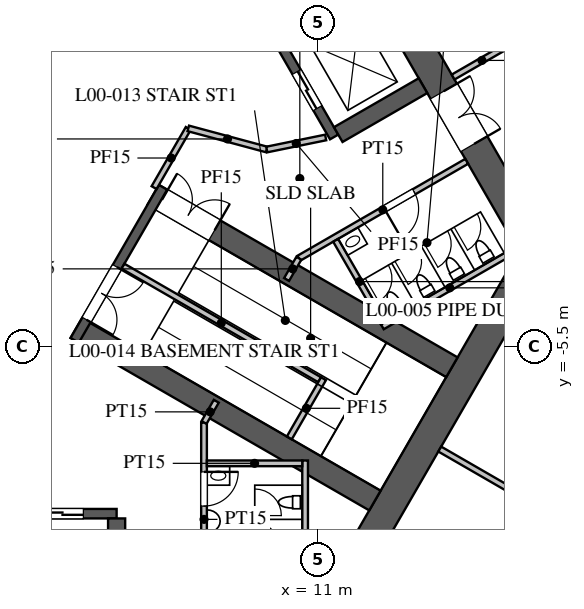
"""IFC4 building model, lengths in metres.
Left out: names, types, materials, properties, quantities, classifications, styles, units other than length and angle.
Written with IfcOpenShell. Run it as: python <this file> out.ifc"""

import sys

from ifc_helpers import new_model, si_unit, direction, frame, frame_2d, origin, place, context, subcontext, project, spatial, polyline, rectangle, outline, extrude, element, fill, save


model = new_model("IFC4")
c1 = context("Model", 3, precision=1e-05, world=origin(), true_north=direction((0.0, 1.0)))
c2 = subcontext(c1, "Body", "Model", "MODEL_VIEW")
j1 = project(units=[si_unit("LENGTHUNIT", "METRE"), si_unit("PLANEANGLEUNIT", "RADIAN")], contexts=[c1])
p1 = place(None, origin())
s1 = spatial("IfcSite", under=j1, at=p1, CompositionType="ELEMENT")
p2 = place(p1, origin())
s2 = spatial("IfcBuilding", under=s1, at=p2, CompositionType="ELEMENT")
p3 = place(p2, origin())
s3 = spatial("IfcBuildingStorey", under=s2, at=p3, CompositionType="ELEMENT", Elevation=0.0)
p4 = place(p3, frame((10.97, -13.0, 0.0), z_axis=(0.0, 0.0, 1.0), x_axis=(0.499995765644, 0.866027848477, 0.0)))
e1 = element("IfcWall", 1, at=p4, inside=s3, PredefinedType="SHEAR", context=c2, shape_type="SweptSolid", body=[
    extrude(rectangle(XDim=11.547, YDim=0.8, at=frame_2d((5.773, 0.0))), origin(), (0.0, 0.0, 1.0), 6.5),
])
p5 = place(p3, frame((16.743, -3.0, 0.0), z_axis=(0.0, 0.0, 1.0), x_axis=(-0.500002442456, 0.866023993627, 0.0)))
e2 = element("IfcWall", 2, at=p5, inside=s3, PredefinedType="SHEAR", context=c2, shape_type="SweptSolid", body=[
    extrude(rectangle(XDim=21.939, YDim=0.8, at=frame_2d((10.97, 0.0))), origin(), (0.0, 0.0, 1.0), 6.5),
])
p6 = place(p5, frame((17.27, 0.0, 0.0)))
e3 = element("IfcOpeningElement", 3, at=p6, cuts=e2, PredefinedType="OPENING", context=c2, shape_type="SweptSolid", body=[
    extrude(rectangle(XDim=1.2, YDim=2.1, at=frame_2d((0.6, 1.05))), frame((0.0, 0.41, 0.0), z_axis=(0.0, -1.0, 0.0), x_axis=(1.0, 0.0, 0.0)), (0.0, 0.0, 1.0), 0.82),
])
p7 = place(p5, frame((3.27, 0.0, 0.0)))
e4 = element("IfcOpeningElement", 4, at=p7, cuts=e2, PredefinedType="OPENING", context=c2, shape_type="SweptSolid", body=[
    extrude(rectangle(XDim=1.6, YDim=2.1, at=frame_2d((0.8, 1.05))), frame((0.0, 0.41, 0.0), z_axis=(0.0, -1.0, 0.0), x_axis=(1.0, 0.0, 0.0)), (0.0, 0.0, 1.0), 0.82),
])
p8 = place(p3, frame((-5.7, -9.9, 0.0), z_axis=(0.0, 0.0, 1.0), x_axis=(1.0, 0.0, 0.0)))
e5 = element("IfcWall", 5, at=p8, inside=s3, PredefinedType="SHEAR", context=c2, shape_type="SweptSolid", body=[
    extrude(rectangle(XDim=11.4, YDim=0.25, at=frame_2d((5.7, 0.0))), origin(), (0.0, 0.0, 1.0), 6.5),
])
p9 = place(p8, frame((0.875, 0.0, 0.0)))
e6 = element("IfcOpeningElement", 6, at=p9, cuts=e5, PredefinedType="OPENING", context=c2, shape_type="SweptSolid", body=[
    extrude(rectangle(XDim=1.1, YDim=2.2, at=frame_2d((0.55, 1.1))), frame((0.0, 0.135, 0.0), z_axis=(0.0, -1.0, 0.0), x_axis=(1.0, 0.0, 0.0)), (0.0, 0.0, 1.0), 0.27),
])
p10 = place(p8, frame((3.725, 0.0, 0.0)))
e7 = element("IfcOpeningElement", 7, at=p10, cuts=e5, PredefinedType="OPENING", context=c2, shape_type="SweptSolid", body=[
    extrude(rectangle(XDim=1.1, YDim=2.2, at=frame_2d((0.55, 1.1))), frame((0.0, 0.135, 0.0), z_axis=(0.0, -1.0, 0.0), x_axis=(1.0, 0.0, 0.0)), (0.0, 0.0, 1.0), 0.27),
])
p11 = place(p8, frame((6.575, 0.0, 0.0)))
e8 = element("IfcOpeningElement", 8, at=p11, cuts=e5, PredefinedType="OPENING", context=c2, shape_type="SweptSolid", body=[
    extrude(rectangle(XDim=1.1, YDim=2.2, at=frame_2d((0.55, 1.1))), frame((0.0, 0.135, 0.0), z_axis=(0.0, -1.0, 0.0), x_axis=(1.0, 0.0, 0.0)), (0.0, 0.0, 1.0), 0.27),
])
p12 = place(p8, frame((9.425, 0.0, 0.0)))
e9 = element("IfcOpeningElement", 9, at=p12, cuts=e5, PredefinedType="OPENING", context=c2, shape_type="SweptSolid", body=[
    extrude(rectangle(XDim=1.1, YDim=2.2, at=frame_2d((0.55, 1.1))), frame((0.0, 0.135, 0.0), z_axis=(0.0, -1.0, 0.0), x_axis=(1.0, 0.0, 0.0)), (0.0, 0.0, 1.0), 0.27),
])
p13 = place(p3, frame((5.7, -10.025, 0.0), z_axis=(0.0, 0.0, 1.0), x_axis=(0.0, -1.0, 0.0)))
e10 = element("IfcWall", 10, at=p13, inside=s3, PredefinedType="SHEAR", context=c2, shape_type="SweptSolid", body=[
    extrude(rectangle(XDim=2.575, YDim=0.45, at=frame_2d((1.288, 0.0))), origin(), (0.0, 0.0, 1.0), 6.5),
])
p14 = place(p3, frame((11.424, 0.014, 0.0), z_axis=(0.0, 0.0, 1.0), x_axis=(-0.500001763848, 0.866024385424, 0.0)))
e11 = element("IfcWall", 11, at=p14, inside=s3, PredefinedType="SHEAR", context=c2, shape_type="SweptSolid", body=[
    extrude(rectangle(XDim=11.4, YDim=0.25, at=frame_2d((5.7, 0.0))), origin(), (0.0, 0.0, 1.0), 6.5),
])
p15 = place(p14, frame((0.875, 0.0, 0.0)))
e12 = element("IfcOpeningElement", 12, at=p15, cuts=e11, PredefinedType="OPENING", context=c2, shape_type="SweptSolid", body=[
    extrude(rectangle(XDim=1.1, YDim=2.2, at=frame_2d((0.55, 1.1))), frame((0.0, 0.135, 0.0), z_axis=(0.0, -1.0, 0.0), x_axis=(1.0, 0.0, 0.0)), (0.0, 0.0, 1.0), 0.27),
])
p16 = place(p14, frame((3.725, 0.0, 0.0)))
e13 = element("IfcOpeningElement", 13, at=p16, cuts=e11, PredefinedType="OPENING", context=c2, shape_type="SweptSolid", body=[
    extrude(rectangle(XDim=1.1, YDim=2.2, at=frame_2d((0.55, 1.1))), frame((0.0, 0.135, 0.0), z_axis=(0.0, -1.0, 0.0), x_axis=(1.0, 0.0, 0.0)), (0.0, 0.0, 1.0), 0.27),
])
p17 = place(p14, frame((6.575, 0.0, 0.0)))
e14 = element("IfcOpeningElement", 14, at=p17, cuts=e11, PredefinedType="OPENING", context=c2, shape_type="SweptSolid", body=[
    extrude(rectangle(XDim=1.1, YDim=2.2, at=frame_2d((0.55, 1.1))), frame((0.0, 0.135, 0.0), z_axis=(0.0, -1.0, 0.0), x_axis=(1.0, 0.0, 0.0)), (0.0, 0.0, 1.0), 0.27),
])
p18 = place(p14, frame((9.425, 0.0, 0.0)))
e15 = element("IfcOpeningElement", 15, at=p18, cuts=e11, PredefinedType="OPENING", context=c2, shape_type="SweptSolid", body=[
    extrude(rectangle(XDim=1.1, YDim=2.2, at=frame_2d((0.55, 1.1))), frame((0.0, 0.135, 0.0), z_axis=(0.0, -1.0, 0.0), x_axis=(1.0, 0.0, 0.0)), (0.0, 0.0, 1.0), 0.27),
])
p19 = place(p3, frame((11.532, 0.076, 0.0), z_axis=(0.0, 0.0, 1.0), x_axis=(0.866005588531, 0.500034319456, 0.0)))
e16 = element("IfcWall", 16, at=p19, inside=s3, PredefinedType="SHEAR", context=c2, shape_type="SweptSolid", body=[
    extrude(rectangle(XDim=2.575, YDim=0.45, at=frame_2d((1.288, 0.0))), origin(), (0.0, 0.0, 1.0), 6.5),
])
p20 = place(p3, frame((4.638, -5.016, 0.0), z_axis=(0.0, 0.0, 1.0), x_axis=(0.866019375473, -0.500010441196, 0.0)))
e17 = element("IfcWall", 17, at=p20, inside=s3, PredefinedType="SHEAR", context=c2, shape_type="SweptSolid", body=[
    extrude(rectangle(XDim=9.075, YDim=0.6, at=frame_2d((4.538, 0.0))), origin(), (0.0, 0.0, 1.0), 6.5),
])
p21 = place(p3, frame((6.663, -1.509, 0.0), z_axis=(0.0, 0.0, 1.0), x_axis=(0.866019375473, -0.500010441196, 0.0)))
e18 = element("IfcWall", 18, at=p21, inside=s3, PredefinedType="SHEAR", context=c2, shape_type="SweptSolid", body=[
    extrude(rectangle(XDim=9.075, YDim=0.6, at=frame_2d((4.538, 0.0))), origin(), (0.0, 0.0, 1.0), 6.5),
])
p22 = place(p21, frame((0.265, 0.0, 0.0)))
e19 = element("IfcOpeningElement", 19, at=p22, cuts=e18, PredefinedType="OPENING", context=c2, shape_type="SweptSolid", body=[
    extrude(rectangle(XDim=1.6, YDim=2.1, at=frame_2d((0.8, 1.05))), frame((0.0, 0.31, 0.0), z_axis=(0.0, -1.0, 0.0), x_axis=(1.0, 0.0, 0.0)), (0.0, 0.0, 1.0), 0.62),
])
p23 = place(p3, frame((4.597, -5.339, 0.0), z_axis=(0.0, 0.0, 1.0), x_axis=(0.499984536904, 0.866034331223, 0.0)))
e20 = element("IfcWall", 20, at=p23, inside=s3, PredefinedType="SHEAR", context=c2, shape_type="SweptSolid", body=[
    extrude(rectangle(XDim=4.65, YDim=0.25, at=frame_2d((2.325, 0.0))), origin(), (0.0, 0.0, 1.0), 6.5),
])
p24 = place(p23, frame((0.625, 0.0, 0.0)))
e21 = element("IfcOpeningElement", 21, at=p24, cuts=e20, PredefinedType="OPENING", context=c2, shape_type="SweptSolid", body=[
    extrude(rectangle(XDim=1.6, YDim=2.1, at=frame_2d((0.8, 1.05))), frame((0.0, 0.135, 0.0), z_axis=(0.0, -1.0, 0.0), x_axis=(1.0, 0.0, 0.0)), (0.0, 0.0, 1.0), 0.27),
])
p25 = place(p3, frame((8.0, -7.5, 0.0), z_axis=(0.0, 0.0, 1.0), x_axis=(0.0, -1.0, 0.0)))
e22 = element("IfcWall", 22, at=p25, inside=s3, PredefinedType="PARTITIONING", context=c2, shape_type="SweptSolid", body=[
    extrude(rectangle(XDim=5.1, YDim=0.15, at=frame_2d((2.55, 0.0))), origin(), (0.0, 0.0, 1.0), 6.3),
])
p26 = place(p25, frame((1.3, 0.0, 0.0)))
e23 = element("IfcOpeningElement", 23, at=p26, cuts=e22, PredefinedType="OPENING", context=c2, shape_type="SweptSolid", body=[
    extrude(rectangle(XDim=0.9, YDim=2.1, at=frame_2d((0.45, 1.05))), frame((0.0, 0.085, 0.0), z_axis=(0.0, -1.0, 0.0), x_axis=(1.0, 0.0, 0.0)), (0.0, 0.0, 1.0), 0.17),
])
p27 = place(p3, frame((10.495, -3.178, 0.0), z_axis=(0.0, 0.0, 1.0), x_axis=(0.86602216432, 0.500005610874, 0.0)))
e24 = element("IfcWall", 24, at=p27, inside=s3, PredefinedType="PARTITIONING", context=c2, shape_type="SweptSolid", body=[
    extrude(rectangle(XDim=5.1, YDim=0.15, at=frame_2d((2.55, 0.0))), origin(), (0.0, 0.0, 1.0), 6.3),
])
p28 = place(p27, frame((2.6, 0.0, 0.0)))
e25 = element("IfcOpeningElement", 25, at=p28, cuts=e24, PredefinedType="OPENING", context=c2, shape_type="SweptSolid", body=[
    extrude(rectangle(XDim=0.9, YDim=2.1, at=frame_2d((0.45, 1.05))), frame((0.0, 0.085, 0.0), z_axis=(0.0, -1.0, 0.0), x_axis=(1.0, 0.0, 0.0)), (0.0, 0.0, 1.0), 0.17),
])
for number, where, z_axis, x_axis in (
    (26, (8.0, -7.5, 0.0), (0.0, 0.0, 1.0), (0.5, 0.866, 0.0)),
    (27, (10.495, -3.178, 0.0), (0.0, 0.0, 1.0), (-0.5, -0.866, 0.0)),
):
    element("IfcWall", number, at=place(p3, frame(where, z_axis=z_axis, x_axis=x_axis)), inside=s3, PredefinedType="PARTITIONING", context=c2, shape_type="SweptSolid", body=[
        extrude(rectangle(XDim=0.645, YDim=0.15, at=frame_2d((0.323, 0.0))), origin(), (0.0, 0.0, 1.0), 6.3),
    ])
p29 = place(p3, frame((10.66, -8.5, 0.0), z_axis=(0.0, 0.0, 1.0), x_axis=(0.0, -1.0, 0.0)))
e28 = element("IfcWall", 28, at=p29, inside=s3, PredefinedType="PARTITIONING", context=c2, shape_type="SweptSolid", body=[
    extrude(rectangle(XDim=4.1, YDim=0.15, at=frame_2d((2.05, 0.0))), origin(), (0.0, 0.0, 1.0), 6.3),
])
p30 = place(p3, frame((8.075, -8.575, 0.0), z_axis=(0.0, 0.0, 1.0), x_axis=(1.0, 0.0, 0.0)))
e29 = element("IfcWall", 29, at=p30, inside=s3, PredefinedType="PARTITIONING", context=c2, shape_type="SweptSolid", body=[
    extrude(rectangle(XDim=2.51, YDim=0.15, at=frame_2d((1.255, 0.0))), origin(), (0.0, 0.0, 1.0), 6.3),
])
p31 = place(p3, frame((12.691, -4.982, 0.0), z_axis=(0.0, 0.0, 1.0), x_axis=(0.8660249478, 0.500000789788, 0.0)))
e30 = element("IfcWall", 30, at=p31, inside=s3, PredefinedType="PARTITIONING", context=c2, shape_type="SweptSolid", body=[
    extrude(rectangle(XDim=4.1, YDim=0.15, at=frame_2d((2.05, 0.0))), origin(), (0.0, 0.0, 1.0), 6.3),
])
p32 = place(p3, frame((11.464, -2.706, 0.0), z_axis=(0.0, 0.0, 1.0), x_axis=(0.50001992892, -0.866013897511, 0.0)))
e31 = element("IfcWall", 31, at=p32, inside=s3, PredefinedType="PARTITIONING", context=c2, shape_type="SweptSolid", body=[
    extrude(rectangle(XDim=2.51, YDim=0.15, at=frame_2d((1.255, 0.0))), origin(), (0.0, 0.0, 1.0), 6.3),
])
p33 = place(p3, frame((14.203, -8.2, 0.0), z_axis=(0.0, 0.0, 1.0), x_axis=(0.866024965723, -0.500000758745, 0.0)))
e32 = element("IfcWall", 32, at=p33, inside=s3, PredefinedType="PARTITIONING", context=c2, shape_type="SweptSolid", body=[
    extrude(rectangle(XDim=18.25, YDim=0.15, at=frame_2d((9.125, 0.0))), origin(), (0.0, 0.0, 1.0), 4.6),
])
p34 = place(p3, frame((5.867, -3.387, 0.0), z_axis=(0.0, 0.0, 1.0), x_axis=(0.866014108153, -0.500019564097, 0.0)))
e33 = element("IfcWall", 33, at=p34, inside=s3, PredefinedType="PARTITIONING", context=c2, shape_type="SweptSolid", body=[
    extrude(outline(polyline([(0.0, 0.0), (5.975, 0.0), (5.975, 4.014), (1.966, 6.3), (0.0, 6.3), (0.0, 0.0)])), frame((0.0, 0.075, 0.0), z_axis=(0.0, -1.0, 0.0), x_axis=(1.0, 0.0, 0.0)), (0.0, 0.0, 1.0), 0.15),
])
p35 = place(p3, frame((10.244, -7.906, 0.0), z_axis=(0.0, 0.0, 1.0), x_axis=(0.499961193289, 0.866047807691, 0.0)))
e34 = element("IfcWall", 34, at=p35, inside=s3, PredefinedType="PARTITIONING", context=c2, shape_type="SweptSolid", body=[
    extrude(rectangle(XDim=1.8, YDim=0.15, at=frame_2d((0.9, 0.0))), origin(), (0.0, 0.0, 1.0), 3.575),
])
p36 = place(p3, frame((6.686, -1.32, 0.0), z_axis=(0.0, 0.0, 1.0), x_axis=(0.500062916607, 0.865989075817, 0.0)))
e35 = element("IfcWall", 35, at=p36, inside=s3, PredefinedType="PARTITIONING", context=c2, shape_type="SweptSolid", body=[
    extrude(rectangle(XDim=1.8, YDim=0.15, at=frame_2d((0.9, 0.0))), origin(), (0.0, 0.0, 1.0), 6.3),
])
p37 = place(p3, frame((7.586, 0.239, 0.0), z_axis=(0.0, 0.0, 1.0), x_axis=(0.965664233544, -0.259793356447, 0.0)))
e36 = element("IfcWall", 36, at=p37, inside=s3, PredefinedType="PARTITIONING", context=c2, shape_type="SweptSolid", body=[
    extrude(rectangle(XDim=2.139, YDim=0.15, at=frame_2d((1.069, 0.0))), origin(), (0.0, 0.0, 1.0), 6.3),
])
p38 = place(p3, frame((9.651, -0.317, 0.0), z_axis=(0.0, 0.0, 1.0), x_axis=(0.979710109184, 0.200419814298, 0.0)))
e37 = element("IfcWall", 37, at=p38, inside=s3, PredefinedType="PARTITIONING", context=c2, shape_type="SweptSolid", body=[
    extrude(rectangle(XDim=1.581, YDim=0.15, at=frame_2d((0.791, 0.0))), origin(), (0.0, 0.0, 1.0), 6.3),
])
p39 = place(p3, frame((14.555, 1.59, 0.0), z_axis=(0.0, 0.0, 1.0), x_axis=(0.866036909293, 0.499980071345, 0.0)))
e38 = element("IfcWall", 38, at=p39, inside=s3, PredefinedType="PARTITIONING", context=c2, shape_type="SweptSolid", body=[
    extrude(rectangle(XDim=1.75, YDim=0.15, at=frame_2d((0.875, 0.0))), origin(), (0.0, 0.0, 1.0), 6.3),
])
p40 = place(p26, origin())
e39 = element("IfcDoor", 39, at=p40, inside=s3, OperationType="SINGLE_SWING_LEFT", PredefinedType="DOOR", context=c2, shape_type="SweptSolid", body=[
    extrude(rectangle(XDim=0.9, YDim=2.1, at=frame_2d((0.45, 1.05))), frame((0.0, 0.025, 0.0), z_axis=(0.0, -1.0, 0.0), x_axis=(1.0, 0.0, 0.0)), (0.0, 0.0, 1.0), 0.05),
])
fill(e23, e39)
p41 = place(p28, frame((0.9, 0.0, 0.0), z_axis=(0.0, 0.0, 1.0), x_axis=(-1.0, 0.0, 0.0)))
e40 = element("IfcDoor", 40, at=p41, inside=s3, OperationType="SINGLE_SWING_RIGHT", PredefinedType="DOOR", context=c2, shape_type="SweptSolid", body=[
    extrude(rectangle(XDim=0.9, YDim=2.1, at=frame_2d((0.45, 1.05))), frame((0.0, 0.025, 0.0), z_axis=(0.0, -1.0, 0.0), x_axis=(1.0, 0.0, 0.0)), (0.0, 0.0, 1.0), 0.05),
])
fill(e25, e40)
p42 = place(p7, frame((1.6, 0.0, 0.0), z_axis=(0.0, 0.0, 1.0), x_axis=(-1.0, 0.0, 0.0)))
e41 = element("IfcDoor", 41, at=p42, inside=s3, OperationType="DOUBLE_DOOR_SINGLE_SWING", PredefinedType="DOOR", context=c2, shape_type="SweptSolid", body=[
    extrude(rectangle(XDim=1.6, YDim=2.1, at=frame_2d((0.8, 1.05))), frame((0.0, 0.025, 0.0), z_axis=(0.0, -1.0, 0.0), x_axis=(1.0, 0.0, 0.0)), (0.0, 0.0, 1.0), 0.05),
])
fill(e4, e41)
p43 = place(p24, frame((1.6, 0.0, 0.0), z_axis=(0.0, 0.0, 1.0), x_axis=(-1.0, 0.0, 0.0)))
e42 = element("IfcDoor", 42, at=p43, inside=s3, OperationType="DOUBLE_DOOR_SINGLE_SWING", PredefinedType="DOOR", context=c2, shape_type="SweptSolid", body=[
    extrude(rectangle(XDim=1.6, YDim=2.1, at=frame_2d((0.8, 1.05))), frame((0.0, 0.025, 0.0), z_axis=(0.0, -1.0, 0.0), x_axis=(1.0, 0.0, 0.0)), (0.0, 0.0, 1.0), 0.05),
])
fill(e21, e42)
p44 = place(p22, origin())
e43 = element("IfcDoor", 43, at=p44, inside=s3, OperationType="DOUBLE_DOOR_SINGLE_SWING", PredefinedType="DOOR", context=c2, shape_type="SweptSolid", body=[
    extrude(rectangle(XDim=1.6, YDim=2.1, at=frame_2d((0.8, 1.05))), frame((0.0, 0.025, 0.0), z_axis=(0.0, -1.0, 0.0), x_axis=(1.0, 0.0, 0.0)), (0.0, 0.0, 1.0), 0.05),
])
fill(e19, e43)
p45 = place(p12, origin())
e44 = element("IfcDoor", 44, at=p45, inside=s3, OperationType="DOUBLE_DOOR_SLIDING", PredefinedType="DOOR", context=c2, shape_type="SweptSolid", body=[
    extrude(rectangle(XDim=1.1, YDim=2.2, at=frame_2d((0.55, 1.1))), frame((0.0, 0.025, 0.0), z_axis=(0.0, -1.0, 0.0), x_axis=(1.0, 0.0, 0.0)), (0.0, 0.0, 1.0), 0.05),
])
fill(e9, e44)
p46 = place(p15, origin())
e45 = element("IfcDoor", 45, at=p46, inside=s3, OperationType="DOUBLE_DOOR_SLIDING", PredefinedType="DOOR", context=c2, shape_type="SweptSolid", body=[
    extrude(rectangle(XDim=1.1, YDim=2.2, at=frame_2d((0.55, 1.1))), frame((0.0, 0.025, 0.0), z_axis=(0.0, -1.0, 0.0), x_axis=(1.0, 0.0, 0.0)), (0.0, 0.0, 1.0), 0.05),
])
fill(e12, e45)
save(model, sys.argv[1])
